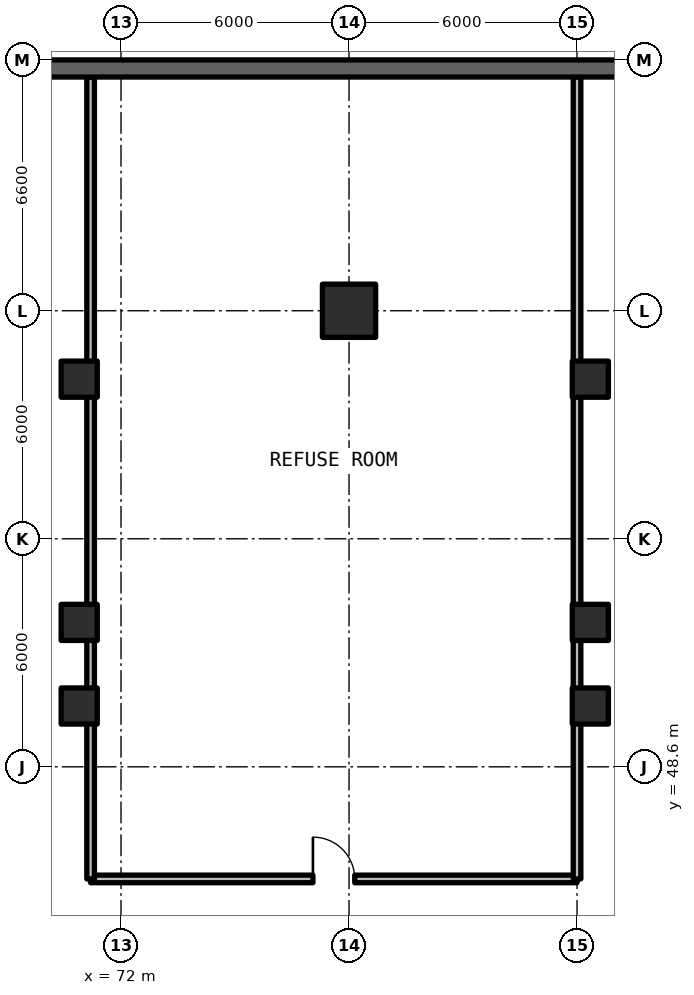
"""IFC4 building model, lengths in metres.
Left out: names, types, materials, properties, quantities, classifications, styles, units other than length and angle.
Written with IfcOpenShell. Run it as: python <this file> out.ifc"""

import sys

from ifc_helpers import new_model, si_unit, direction, frame, frame_2d, origin, origin_2d, place, context, subcontext, project, spatial, rectangle, circle, extrude, element, fill, save


model = new_model("IFC4")
c1 = context("Model", 3, precision=1e-05, world=origin(), true_north=direction((0.0, 1.0)))
c2 = subcontext(c1, "Body", "Model", "MODEL_VIEW")
j1 = project(units=[si_unit("LENGTHUNIT", "METRE"), si_unit("PLANEANGLEUNIT", "RADIAN")], contexts=[c1])
p1 = place(None, origin())
s1 = spatial("IfcSite", under=j1, at=p1, CompositionType="ELEMENT")
p2 = place(p1, origin())
s2 = spatial("IfcBuilding", under=s1, at=p2, CompositionType="ELEMENT")
p3 = place(p2, frame((0.0, 0.0, -4.62)))
s3 = spatial("IfcBuildingStorey", under=s2, at=p3, CompositionType="ELEMENT", Elevation=-4.62)
p4 = place(p3, frame((78.0, 60.6, 0.0), z_axis=(0.0, 0.0, 1.0), x_axis=(1.0, 0.0, 0.0)))
e1 = element("IfcColumn", 1, at=p4, inside=s3, PredefinedType="COLUMN", context=c2, shape_type="SweptSolid", body=[
    extrude(circle(Radius=0.7, at=origin_2d()), origin(), (0.0, 0.0, 1.0), 4.62),
])
for number, where, z_axis, x_axis in (
    (2, (70.9, 52.4, 0.0), (0.0, 0.0, 1.0), (1.0, 0.0, 0.0)),
    (3, (70.9, 50.2, 0.0), (0.0, 0.0, 1.0), (1.0, 0.0, 0.0)),
    (4, (70.9, 58.8, 0.0), (0.0, 0.0, 1.0), (1.0, 0.0, 0.0)),
    (5, (84.35, 52.4, 0.0), (0.0, 0.0, 1.0), (1.0, 0.0, 0.0)),
    (6, (84.35, 50.2, 0.0), (0.0, 0.0, 1.0), (1.0, 0.0, 0.0)),
    (7, (84.35, 58.8, 0.0), (0.0, 0.0, 1.0), (1.0, 0.0, 0.0)),
):
    element("IfcColumn", number, at=place(p3, frame(where, z_axis=z_axis, x_axis=x_axis)), inside=s3, PredefinedType="COLUMN", context=c2, shape_type="SweptSolid", body=[
        extrude(rectangle(XDim=0.95, YDim=0.95, at=origin_2d()), origin(), (0.0, 0.0, 1.0), 4.34),
    ])
p5 = place(p3, frame((113.775, 66.975, 0.0), z_axis=(0.0, 0.0, 1.0), x_axis=(-1.0, 0.0, 0.0)))
e8 = element("IfcWall", 8, at=p5, inside=s3, PredefinedType="USERDEFINED", context=c2, shape_type="SweptSolid", body=[
    extrude(rectangle(XDim=113.55, YDim=0.45, at=frame_2d((56.775, 0.0))), origin(), (0.0, 0.0, 1.0), 4.34),
])
p6 = place(p3, frame((71.2, 45.65, 0.0), z_axis=(0.0, 0.0, 1.0), x_axis=(1.0, 0.0, 0.0)))
e9 = element("IfcWall", 9, at=p6, inside=s3, PredefinedType="SOLIDWALL", context=c2, shape_type="SweptSolid", body=[
    extrude(rectangle(XDim=12.8, YDim=0.2, at=frame_2d((6.4, 0.0))), origin(), (0.0, 0.0, 1.0), 3.56),
])
p7 = place(p6, frame((5.85, 0.0, 0.0)))
e10 = element("IfcOpeningElement", 10, at=p7, cuts=e9, PredefinedType="OPENING", context=c2, shape_type="SweptSolid", body=[
    extrude(rectangle(XDim=1.1, YDim=2.15, at=frame_2d((0.55, 1.075))), frame((0.0, 0.11, 0.0), z_axis=(0.0, -1.0, 0.0), x_axis=(1.0, 0.0, 0.0)), (0.0, 0.0, 1.0), 0.22),
])
for number, where, z_axis, x_axis in (
    (11, (71.2, 45.65, 0.0), (0.0, 0.0, 1.0), (0.0, 1.0, 0.0)),
    (12, (84.0, 45.65, 0.0), (0.0, 0.0, 1.0), (0.0, 1.0, 0.0)),
):
    element("IfcWall", number, at=place(p3, frame(where, z_axis=z_axis, x_axis=x_axis)), inside=s3, PredefinedType="SOLIDWALL", context=c2, shape_type="SweptSolid", body=[
        extrude(rectangle(XDim=21.1, YDim=0.2, at=frame_2d((10.55, 0.0))), origin(), (0.0, 0.0, 1.0), 3.56),
    ])
p8 = place(p7, origin())
e13 = element("IfcDoor", 13, at=p8, inside=s3, OperationType="SINGLE_SWING_LEFT", PredefinedType="DOOR", context=c2, shape_type="SweptSolid", body=[
    extrude(rectangle(XDim=1.1, YDim=2.15, at=frame_2d((0.55, 1.075))), frame((0.0, 0.025, 0.0), z_axis=(0.0, -1.0, 0.0), x_axis=(1.0, 0.0, 0.0)), (0.0, 0.0, 1.0), 0.05),
])
fill(e10, e13)
save(model, sys.argv[1])
